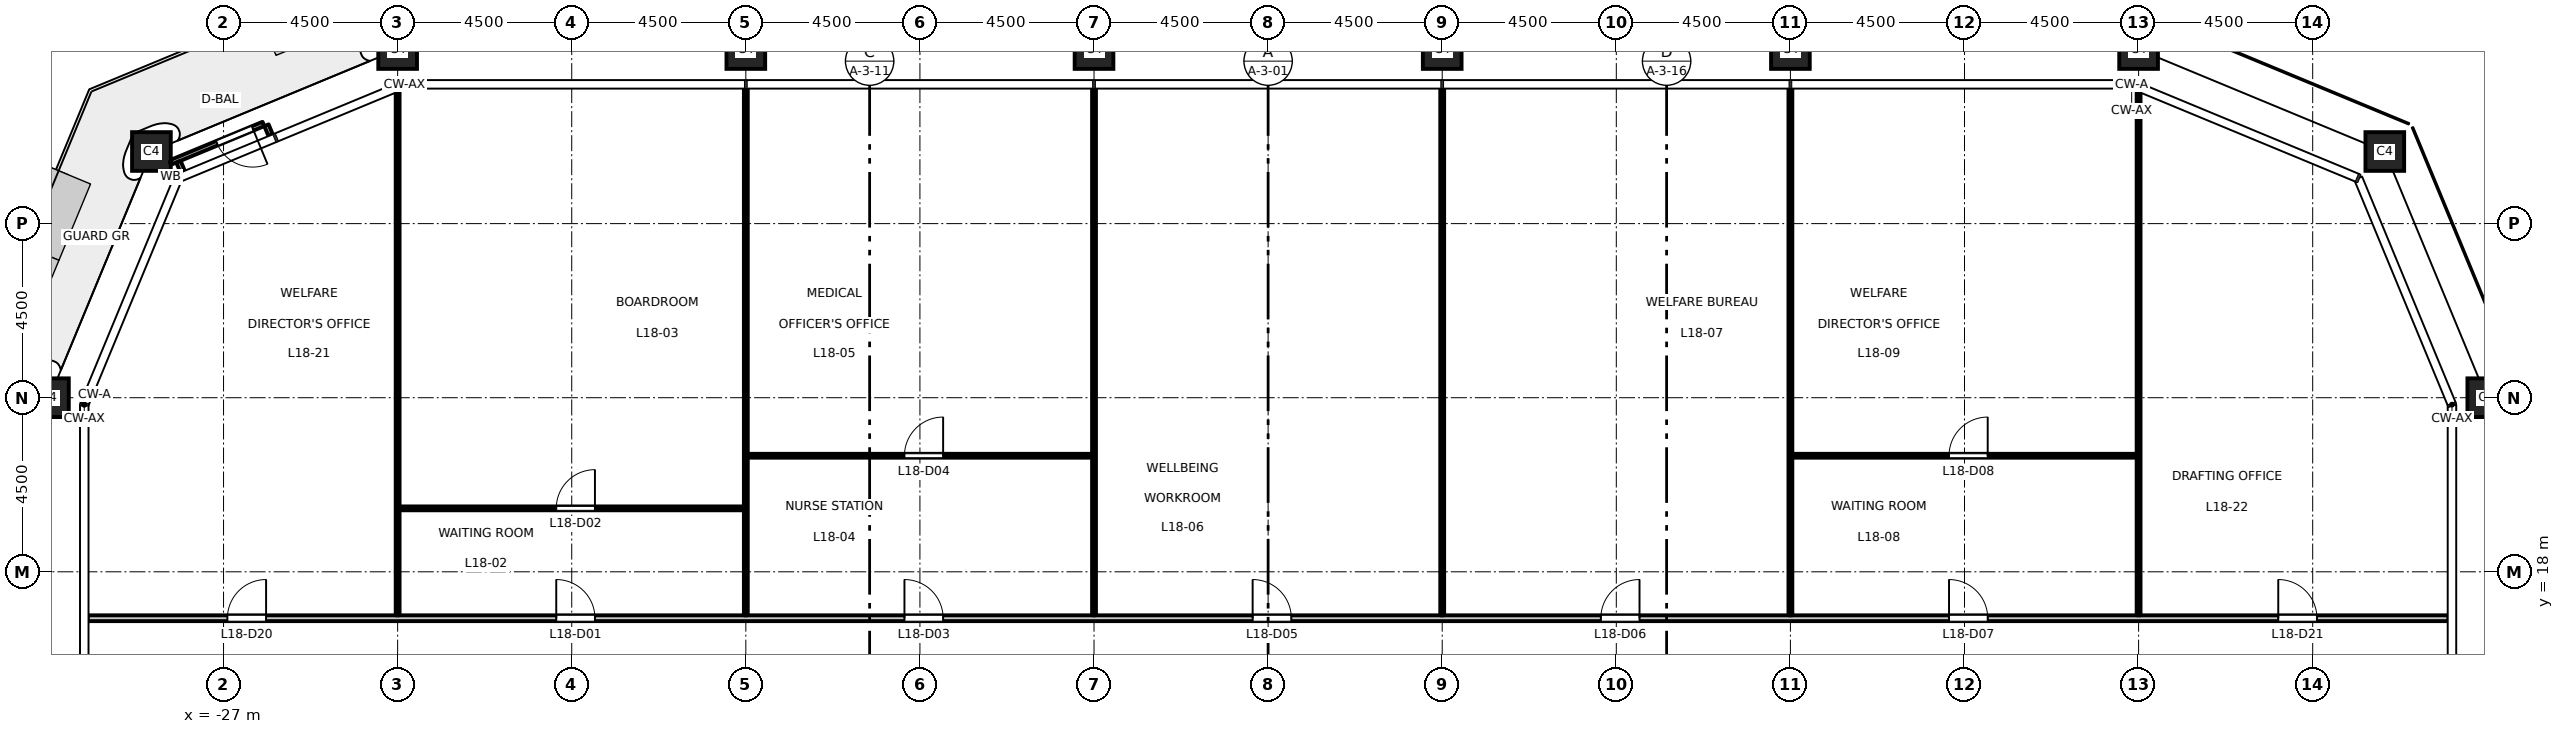
"""IFC4 building model, lengths in metres.
Left out: names, types, materials, properties, quantities, classifications, styles, units other than length and angle.
Written with IfcOpenShell. Run it as: python <this file> out.ifc"""

import sys

from ifc_helpers import new_model, si_unit, direction, frame, frame_2d, origin, origin_2d, place, context, subcontext, project, spatial, rectangle, hollow_rectangle, extrude, element, fill, save


model = new_model("IFC4")
c1 = context("Model", 3, precision=1e-05, world=origin(), true_north=direction((0.0, 1.0)))
c2 = subcontext(c1, "Body", "Model", "MODEL_VIEW")
j1 = project(units=[si_unit("LENGTHUNIT", "METRE"), si_unit("PLANEANGLEUNIT", "RADIAN")], contexts=[c1])
p1 = place(None, origin())
s1 = spatial("IfcSite", under=j1, at=p1, CompositionType="ELEMENT")
p2 = place(p1, origin())
s2 = spatial("IfcBuilding", under=s1, at=p2, CompositionType="ELEMENT")
p3 = place(p2, frame((0.0, 0.0, 85.2)))
s3 = spatial("IfcBuildingStorey", under=s2, at=p3, CompositionType="ELEMENT", Elevation=85.2)
for number, where, z_axis, x_axis in (
    (1, (31.5, 22.5, 0.0), (0.0, 0.0, 1.0), (1.0, 0.0, 0.0)),
    (2, (28.864, 28.864, 0.0), (0.0, 0.0, 1.0), (1.0, 0.0, 0.0)),
    (3, (22.5, 31.5, 0.0), (0.0, 0.0, 1.0), (1.0, 0.0, 0.0)),
    (4, (13.5, 31.5, 0.0), (0.0, 0.0, 1.0), (1.0, 0.0, 0.0)),
    (5, (4.5, 31.5, 0.0), (0.0, 0.0, 1.0), (1.0, 0.0, 0.0)),
    (6, (-4.5, 31.5, 0.0), (0.0, 0.0, 1.0), (1.0, 0.0, 0.0)),
    (7, (-13.5, 31.5, 0.0), (0.0, 0.0, 1.0), (1.0, 0.0, 0.0)),
    (8, (-22.5, 31.5, 0.0), (0.0, 0.0, 1.0), (1.0, 0.0, 0.0)),
    (9, (-28.864, 28.864, 0.0), (0.0, 0.0, 1.0), (1.0, 0.0, 0.0)),
    (10, (-31.5, 22.5, 0.0), (0.0, 0.0, 1.0), (1.0, 0.0, 0.0)),
):
    element("IfcColumn", number, at=place(p3, frame(where, z_axis=z_axis, x_axis=x_axis)), inside=s3, PredefinedType="COLUMN", context=c2, shape_type="SweptSolid", body=[
        extrude(hollow_rectangle(XDim=1.0, YDim=1.0, WallThickness=0.06, at=origin_2d()), origin(), (0.0, 0.0, 1.0), 4.5),
    ])
p4 = place(p3, frame((-25.783, 29.285, 0.0), z_axis=(0.0, 0.0, 1.0), x_axis=(-0.382942403136, 0.923772220778, 0.0)))
e11 = element("IfcWall", 11, at=p4, inside=s3, PredefinedType="STANDARD", context=c2, shape_type="SweptSolid", body=[
    extrude(rectangle(XDim=0.28, YDim=0.12, at=frame_2d((0.14, 0.0))), origin(), (0.0, 0.0, 1.0), 4.35),
])
p5 = place(p3, frame((-28.058, 28.343, 0.0), z_axis=(0.0, 0.0, 1.0), x_axis=(-0.382634050621, 0.923899985553, 0.0)))
e12 = element("IfcWall", 12, at=p5, inside=s3, PredefinedType="STANDARD", context=c2, shape_type="SweptSolid", body=[
    extrude(rectangle(XDim=0.28, YDim=0.12, at=frame_2d((0.14, 0.0))), origin(), (0.0, 0.0, 1.0), 4.35),
])
p6 = place(p3, frame((-25.969, 29.576, 0.0), z_axis=(0.0, 0.0, 1.0), x_axis=(-0.923894017707, -0.382648460137, 0.0)))
e13 = element("IfcWall", 13, at=p6, inside=s3, PredefinedType="STANDARD", context=c2, shape_type="SweptSolid", body=[
    extrude(rectangle(XDim=2.592, YDim=0.12, at=frame_2d((1.296, 0.0))), origin(), (0.0, 0.0, 1.0), 4.35),
])
p7 = place(p6, frame((0.3, 0.0, 0.0)))
e14 = element("IfcOpeningElement", 14, at=p7, cuts=e13, PredefinedType="OPENING", context=c2, shape_type="SweptSolid", body=[
    extrude(rectangle(XDim=1.0, YDim=2.4, at=frame_2d((0.5, 1.2))), frame((0.0, 0.07, 0.0), z_axis=(0.0, -1.0, 0.0), x_axis=(1.0, 0.0, 0.0)), (0.0, 0.0, 1.0), 0.14),
])
p8 = place(p3, frame((-30.51, 16.8, 0.0), z_axis=(0.0, 0.0, 1.0), x_axis=(1.0, 0.0, 0.0)))
e15 = element("IfcWall", 15, at=p8, inside=s3, PredefinedType="PARTITIONING", context=c2, shape_type="SweptSolid", body=[
    extrude(rectangle(XDim=61.02, YDim=0.15, at=frame_2d((30.51, 0.0))), origin(), (0.0, 0.0, 1.0), 4.35),
])
p9 = place(p8, frame((12.11, 0.0, 0.0)))
e16 = element("IfcOpeningElement", 16, at=p9, cuts=e15, PredefinedType="OPENING", context=c2, shape_type="SweptSolid", body=[
    extrude(rectangle(XDim=1.0, YDim=2.1, at=frame_2d((0.5, 1.05))), frame((0.0, 0.085, 0.0), z_axis=(0.0, -1.0, 0.0), x_axis=(1.0, 0.0, 0.0)), (0.0, 0.0, 1.0), 0.17),
])
p10 = place(p8, frame((21.11, 0.0, 0.0)))
e17 = element("IfcOpeningElement", 17, at=p10, cuts=e15, PredefinedType="OPENING", context=c2, shape_type="SweptSolid", body=[
    extrude(rectangle(XDim=1.0, YDim=2.1, at=frame_2d((0.5, 1.05))), frame((0.0, 0.085, 0.0), z_axis=(0.0, -1.0, 0.0), x_axis=(1.0, 0.0, 0.0)), (0.0, 0.0, 1.0), 0.17),
])
p11 = place(p8, frame((30.11, 0.0, 0.0)))
e18 = element("IfcOpeningElement", 18, at=p11, cuts=e15, PredefinedType="OPENING", context=c2, shape_type="SweptSolid", body=[
    extrude(rectangle(XDim=1.0, YDim=2.1, at=frame_2d((0.5, 1.05))), frame((0.0, 0.085, 0.0), z_axis=(0.0, -1.0, 0.0), x_axis=(1.0, 0.0, 0.0)), (0.0, 0.0, 1.0), 0.17),
])
p12 = place(p8, frame((39.11, 0.0, 0.0)))
e19 = element("IfcOpeningElement", 19, at=p12, cuts=e15, PredefinedType="OPENING", context=c2, shape_type="SweptSolid", body=[
    extrude(rectangle(XDim=1.0, YDim=2.1, at=frame_2d((0.5, 1.05))), frame((0.0, 0.085, 0.0), z_axis=(0.0, -1.0, 0.0), x_axis=(1.0, 0.0, 0.0)), (0.0, 0.0, 1.0), 0.17),
])
p13 = place(p8, frame((48.11, 0.0, 0.0)))
e20 = element("IfcOpeningElement", 20, at=p13, cuts=e15, PredefinedType="OPENING", context=c2, shape_type="SweptSolid", body=[
    extrude(rectangle(XDim=1.0, YDim=2.1, at=frame_2d((0.5, 1.05))), frame((0.0, 0.085, 0.0), z_axis=(0.0, -1.0, 0.0), x_axis=(1.0, 0.0, 0.0)), (0.0, 0.0, 1.0), 0.17),
])
p14 = place(p8, frame((3.61, 0.0, 0.0)))
e21 = element("IfcOpeningElement", 21, at=p14, cuts=e15, PredefinedType="OPENING", context=c2, shape_type="SweptSolid", body=[
    extrude(rectangle(XDim=1.0, YDim=2.1, at=frame_2d((0.5, 1.05))), frame((0.0, 0.085, 0.0), z_axis=(0.0, -1.0, 0.0), x_axis=(1.0, 0.0, 0.0)), (0.0, 0.0, 1.0), 0.17),
])
p15 = place(p8, frame((56.62, 0.0, 0.0)))
e22 = element("IfcOpeningElement", 22, at=p15, cuts=e15, PredefinedType="OPENING", context=c2, shape_type="SweptSolid", body=[
    extrude(rectangle(XDim=1.0, YDim=2.1, at=frame_2d((0.5, 1.05))), frame((0.0, 0.085, 0.0), z_axis=(0.0, -1.0, 0.0), x_axis=(1.0, 0.0, 0.0)), (0.0, 0.0, 1.0), 0.17),
])
p16 = place(p3, frame((-22.45, 19.64, 0.0), z_axis=(0.0, 0.0, 1.0), x_axis=(1.0, 0.0, 0.0)))
e23 = element("IfcWall", 23, at=p16, inside=s3, PredefinedType="PARTITIONING", context=c2, shape_type="SweptSolid", body=[
    extrude(rectangle(XDim=8.9, YDim=0.1, at=frame_2d((4.45, 0.0))), origin(), (0.0, 0.0, 1.0), 4.35),
])
p17 = place(p16, frame((4.05, 0.0, 0.0)))
e24 = element("IfcOpeningElement", 24, at=p17, cuts=e23, PredefinedType="OPENING", context=c2, shape_type="SweptSolid", body=[
    extrude(rectangle(XDim=1.0, YDim=2.1, at=frame_2d((0.5, 1.05))), frame((0.0, 0.06, 0.0), z_axis=(0.0, -1.0, 0.0), x_axis=(1.0, 0.0, 0.0)), (0.0, 0.0, 1.0), 0.12),
])
p18 = place(p3, frame((-13.45, 21.0, 0.0), z_axis=(0.0, 0.0, 1.0), x_axis=(1.0, 0.0, 0.0)))
e25 = element("IfcWall", 25, at=p18, inside=s3, PredefinedType="PARTITIONING", context=c2, shape_type="SweptSolid", body=[
    extrude(rectangle(XDim=8.9, YDim=0.1, at=frame_2d((4.45, 0.0))), origin(), (0.0, 0.0, 1.0), 4.35),
])
p19 = place(p18, frame((4.05, 0.0, 0.0)))
e26 = element("IfcOpeningElement", 26, at=p19, cuts=e25, PredefinedType="OPENING", context=c2, shape_type="SweptSolid", body=[
    extrude(rectangle(XDim=1.0, YDim=2.1, at=frame_2d((0.5, 1.05))), frame((0.0, 0.06, 0.0), z_axis=(0.0, -1.0, 0.0), x_axis=(1.0, 0.0, 0.0)), (0.0, 0.0, 1.0), 0.12),
])
p20 = place(p3, frame((13.55, 21.0, 0.0), z_axis=(0.0, 0.0, 1.0), x_axis=(1.0, 0.0, 0.0)))
e27 = element("IfcWall", 27, at=p20, inside=s3, PredefinedType="PARTITIONING", context=c2, shape_type="SweptSolid", body=[
    extrude(rectangle(XDim=8.9, YDim=0.1, at=frame_2d((4.45, 0.0))), origin(), (0.0, 0.0, 1.0), 4.35),
])
p21 = place(p20, frame((4.05, 0.0, 0.0)))
e28 = element("IfcOpeningElement", 28, at=p21, cuts=e27, PredefinedType="OPENING", context=c2, shape_type="SweptSolid", body=[
    extrude(rectangle(XDim=1.0, YDim=2.1, at=frame_2d((0.5, 1.05))), frame((0.0, 0.06, 0.0), z_axis=(0.0, -1.0, 0.0), x_axis=(1.0, 0.0, 0.0)), (0.0, 0.0, 1.0), 0.12),
])
p22 = place(p3, frame((-22.5, 16.875, 0.0), z_axis=(0.0, 0.0, 1.0), x_axis=(0.0, 1.0, 0.0)))
e29 = element("IfcWall", 29, at=p22, inside=s3, PredefinedType="PARTITIONING", context=c2, shape_type="SweptSolid", body=[
    extrude(rectangle(XDim=13.553, YDim=0.1, at=frame_2d((6.776, 0.0))), origin(), (0.0, 0.0, 1.0), 3.35),
])
for number, where, z_axis, x_axis in (
    (30, (-13.5, 16.875, 0.0), (0.0, 0.0, 1.0), (0.0, 1.0, 0.0)),
    (31, (-4.5, 16.875, 0.0), (0.0, 0.0, 1.0), (0.0, 1.0, 0.0)),
    (32, (4.5, 16.875, 0.0), (0.0, 0.0, 1.0), (0.0, 1.0, 0.0)),
    (33, (13.5, 16.875, 0.0), (0.0, 0.0, 1.0), (0.0, 1.0, 0.0)),
):
    element("IfcWall", number, at=place(p3, frame(where, z_axis=z_axis, x_axis=x_axis)), inside=s3, PredefinedType="PARTITIONING", context=c2, shape_type="SweptSolid", body=[
        extrude(rectangle(XDim=13.635, YDim=0.1, at=frame_2d((6.817, 0.0))), origin(), (0.0, 0.0, 1.0), 3.35),
    ])
p23 = place(p3, frame((22.5, 16.875, 0.0), z_axis=(0.0, 0.0, 1.0), x_axis=(0.0, 1.0, 0.0)))
e34 = element("IfcWall", 34, at=p23, inside=s3, PredefinedType="PARTITIONING", context=c2, shape_type="SweptSolid", body=[
    extrude(rectangle(XDim=13.553, YDim=0.1, at=frame_2d((6.776, 0.0))), origin(), (0.0, 0.0, 1.0), 3.35),
])
p24 = place(p7, origin())
e35 = element("IfcDoor", 35, at=p24, inside=s3, OperationType="SINGLE_SWING_LEFT", PredefinedType="DOOR", context=c2, shape_type="SweptSolid", body=[
    extrude(rectangle(XDim=1.0, YDim=2.4, at=frame_2d((0.5, 1.2))), frame((0.0, 0.025, 0.0), z_axis=(0.0, -1.0, 0.0), x_axis=(1.0, 0.0, 0.0)), (0.0, 0.0, 1.0), 0.05),
])
fill(e14, e35)
p25 = place(p9, origin())
e36 = element("IfcDoor", 36, at=p25, inside=s3, OperationType="SINGLE_SWING_LEFT", PredefinedType="DOOR", context=c2, shape_type="SweptSolid", body=[
    extrude(rectangle(XDim=1.0, YDim=2.1, at=frame_2d((0.5, 1.05))), frame((0.0, 0.025, 0.0), z_axis=(0.0, -1.0, 0.0), x_axis=(1.0, 0.0, 0.0)), (0.0, 0.0, 1.0), 0.05),
])
fill(e16, e36)
p26 = place(p17, origin())
e37 = element("IfcDoor", 37, at=p26, inside=s3, OperationType="SINGLE_SWING_RIGHT", PredefinedType="DOOR", context=c2, shape_type="SweptSolid", body=[
    extrude(rectangle(XDim=1.0, YDim=2.1, at=frame_2d((0.5, 1.05))), frame((0.0, 0.025, 0.0), z_axis=(0.0, -1.0, 0.0), x_axis=(1.0, 0.0, 0.0)), (0.0, 0.0, 1.0), 0.05),
])
fill(e24, e37)
p27 = place(p10, origin())
e38 = element("IfcDoor", 38, at=p27, inside=s3, OperationType="SINGLE_SWING_LEFT", PredefinedType="DOOR", context=c2, shape_type="SweptSolid", body=[
    extrude(rectangle(XDim=1.0, YDim=2.1, at=frame_2d((0.5, 1.05))), frame((0.0, 0.025, 0.0), z_axis=(0.0, -1.0, 0.0), x_axis=(1.0, 0.0, 0.0)), (0.0, 0.0, 1.0), 0.05),
])
fill(e17, e38)
p28 = place(p19, origin())
e39 = element("IfcDoor", 39, at=p28, inside=s3, OperationType="SINGLE_SWING_RIGHT", PredefinedType="DOOR", context=c2, shape_type="SweptSolid", body=[
    extrude(rectangle(XDim=1.0, YDim=2.1, at=frame_2d((0.5, 1.05))), frame((0.0, 0.025, 0.0), z_axis=(0.0, -1.0, 0.0), x_axis=(1.0, 0.0, 0.0)), (0.0, 0.0, 1.0), 0.05),
])
fill(e26, e39)
p29 = place(p11, origin())
e40 = element("IfcDoor", 40, at=p29, inside=s3, OperationType="SINGLE_SWING_LEFT", PredefinedType="DOOR", context=c2, shape_type="SweptSolid", body=[
    extrude(rectangle(XDim=1.0, YDim=2.1, at=frame_2d((0.5, 1.05))), frame((0.0, 0.025, 0.0), z_axis=(0.0, -1.0, 0.0), x_axis=(1.0, 0.0, 0.0)), (0.0, 0.0, 1.0), 0.05),
])
fill(e18, e40)
p30 = place(p12, origin())
e41 = element("IfcDoor", 41, at=p30, inside=s3, OperationType="SINGLE_SWING_RIGHT", PredefinedType="DOOR", context=c2, shape_type="SweptSolid", body=[
    extrude(rectangle(XDim=1.0, YDim=2.1, at=frame_2d((0.5, 1.05))), frame((0.0, 0.025, 0.0), z_axis=(0.0, -1.0, 0.0), x_axis=(1.0, 0.0, 0.0)), (0.0, 0.0, 1.0), 0.05),
])
fill(e19, e41)
p31 = place(p13, origin())
e42 = element("IfcDoor", 42, at=p31, inside=s3, OperationType="SINGLE_SWING_LEFT", PredefinedType="DOOR", context=c2, shape_type="SweptSolid", body=[
    extrude(rectangle(XDim=1.0, YDim=2.1, at=frame_2d((0.5, 1.05))), frame((0.0, 0.025, 0.0), z_axis=(0.0, -1.0, 0.0), x_axis=(1.0, 0.0, 0.0)), (0.0, 0.0, 1.0), 0.05),
])
fill(e20, e42)
p32 = place(p21, origin())
e43 = element("IfcDoor", 43, at=p32, inside=s3, OperationType="SINGLE_SWING_RIGHT", PredefinedType="DOOR", context=c2, shape_type="SweptSolid", body=[
    extrude(rectangle(XDim=1.0, YDim=2.1, at=frame_2d((0.5, 1.05))), frame((0.0, 0.025, 0.0), z_axis=(0.0, -1.0, 0.0), x_axis=(1.0, 0.0, 0.0)), (0.0, 0.0, 1.0), 0.05),
])
fill(e28, e43)
p33 = place(p14, origin())
e44 = element("IfcDoor", 44, at=p33, inside=s3, OperationType="SINGLE_SWING_RIGHT", PredefinedType="DOOR", context=c2, shape_type="SweptSolid", body=[
    extrude(rectangle(XDim=1.0, YDim=2.1, at=frame_2d((0.5, 1.05))), frame((0.0, 0.025, 0.0), z_axis=(0.0, -1.0, 0.0), x_axis=(1.0, 0.0, 0.0)), (0.0, 0.0, 1.0), 0.05),
])
fill(e21, e44)
p34 = place(p15, origin())
e45 = element("IfcDoor", 45, at=p34, inside=s3, OperationType="SINGLE_SWING_LEFT", PredefinedType="DOOR", context=c2, shape_type="SweptSolid", body=[
    extrude(rectangle(XDim=1.0, YDim=2.1, at=frame_2d((0.5, 1.05))), frame((0.0, 0.025, 0.0), z_axis=(0.0, -1.0, 0.0), x_axis=(1.0, 0.0, 0.0)), (0.0, 0.0, 1.0), 0.05),
])
fill(e22, e45)
save(model, sys.argv[1])
